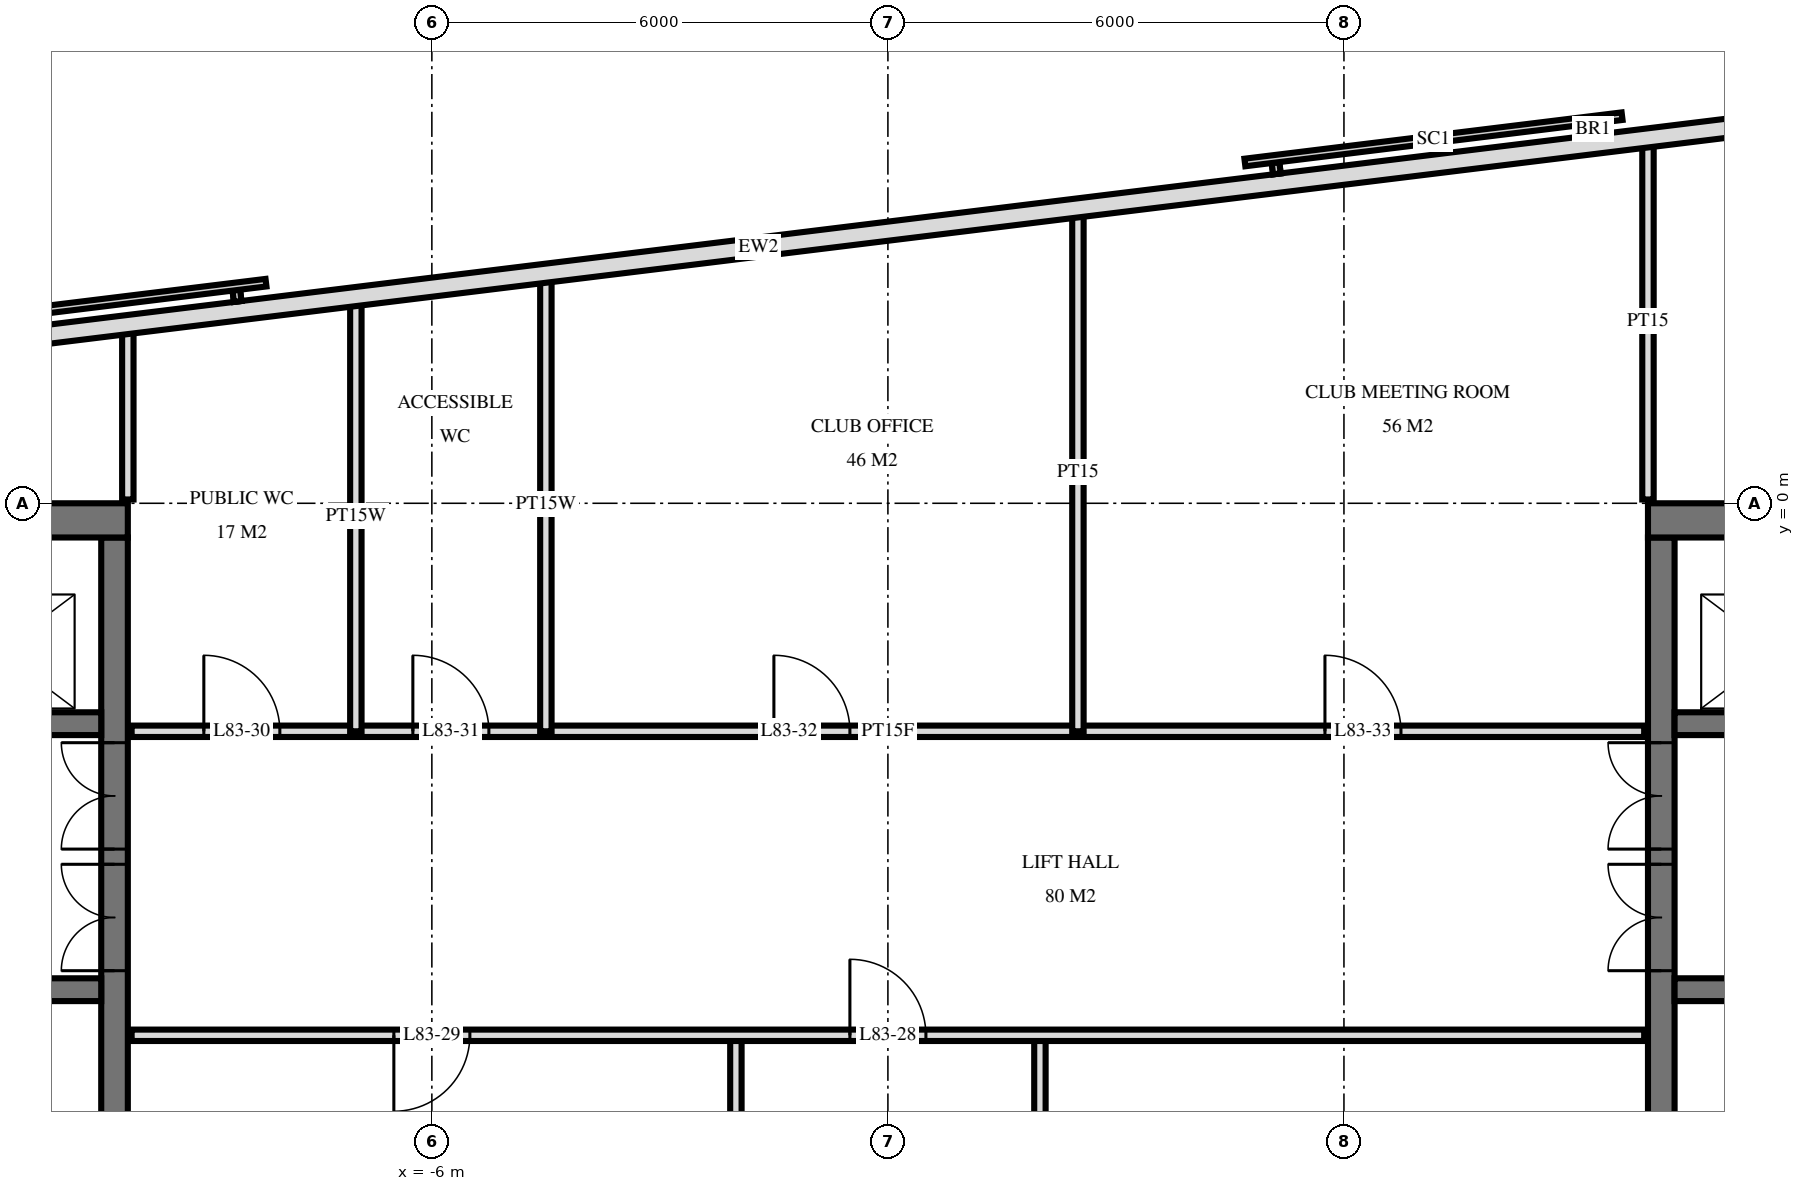
"""IFC4 building model, lengths in metres.
Left out: names, types, materials, properties, quantities, classifications, styles, units other than length and angle.
Written with IfcOpenShell. Run it as: python <this file> out.ifc"""

import sys

from ifc_helpers import new_model, si_unit, direction, frame, frame_2d, origin, place, context, subcontext, project, spatial, rectangle, extrude, element, fill, save


model = new_model("IFC4")
c1 = context("Model", 3, precision=1e-05, world=origin(), true_north=direction((0.0, 1.0)))
c2 = subcontext(c1, "Body", "Model", "MODEL_VIEW")
j1 = project(units=[si_unit("LENGTHUNIT", "METRE"), si_unit("PLANEANGLEUNIT", "RADIAN")], contexts=[c1])
p1 = place(None, origin())
s1 = spatial("IfcSite", under=j1, at=p1, CompositionType="ELEMENT")
p2 = place(p1, origin())
s2 = spatial("IfcBuilding", under=s1, at=p2, CompositionType="ELEMENT")
p3 = place(p2, frame((0.0, 0.0, 314.6)))
s3 = spatial("IfcBuildingStorey", under=s2, at=p3, CompositionType="ELEMENT", Elevation=314.6)
p4 = place(p3, frame((-19.5, -0.225, 0.0), z_axis=(0.0, 0.0, 1.0), x_axis=(1.0, 0.0, 0.0)))
e1 = element("IfcWall", 1, at=p4, inside=s3, PredefinedType="SHEAR", context=c2, shape_type="SweptSolid", body=[
    extrude(rectangle(XDim=9.5, YDim=0.45, at=frame_2d((4.75, 0.0))), origin(), (0.0, 0.0, 1.0), 4.0),
])
p5 = place(p3, frame((-10.175, -14.55, 0.0), z_axis=(0.0, 0.0, 1.0), x_axis=(0.0, 1.0, 0.0)))
e2 = element("IfcWall", 2, at=p5, inside=s3, PredefinedType="SHEAR", context=c2, shape_type="SweptSolid", body=[
    extrude(rectangle(XDim=14.1, YDim=0.35, at=frame_2d((7.05, 0.0))), origin(), (0.0, 0.0, 1.0), 4.0),
])
p6 = place(p5, frame((8.4, 0.0, 0.0)))
e3 = element("IfcOpeningElement", 3, at=p6, cuts=e2, PredefinedType="OPENING", context=c2, shape_type="SweptSolid", body=[
    extrude(rectangle(XDim=1.4, YDim=2.4, at=frame_2d((0.7, 1.2))), frame((0.0, 0.185, 0.0), z_axis=(0.0, -1.0, 0.0), x_axis=(1.0, 0.0, 0.0)), (0.0, 0.0, 1.0), 0.37),
])
p7 = place(p5, frame((10.0, 0.0, 0.0)))
e4 = element("IfcOpeningElement", 4, at=p7, cuts=e2, PredefinedType="OPENING", context=c2, shape_type="SweptSolid", body=[
    extrude(rectangle(XDim=1.4, YDim=2.4, at=frame_2d((0.7, 1.2))), frame((0.0, 0.185, 0.0), z_axis=(0.0, -1.0, 0.0), x_axis=(1.0, 0.0, 0.0)), (0.0, 0.0, 1.0), 0.37),
])
p8 = place(p5, frame((4.0, 0.0, 0.0)))
e5 = element("IfcOpeningElement", 5, at=p8, cuts=e2, PredefinedType="OPENING", context=c2, shape_type="SweptSolid", body=[
    extrude(rectangle(XDim=1.2, YDim=2.1, at=frame_2d((0.6, 1.05))), frame((0.0, 0.185, 0.0), z_axis=(0.0, -1.0, 0.0), x_axis=(1.0, 0.0, 0.0)), (0.0, 0.0, 1.0), 0.37),
])
p9 = place(p3, frame((-19.05, -2.9, 0.0), z_axis=(0.0, 0.0, 1.0), x_axis=(1.0, 0.0, 0.0)))
e6 = element("IfcWall", 6, at=p9, inside=s3, PredefinedType="SHEAR", context=c2, shape_type="SweptSolid", body=[
    extrude(rectangle(XDim=8.7, YDim=0.3, at=frame_2d((4.35, 0.0))), origin(), (0.0, 0.0, 1.0), 4.0),
])
p10 = place(p9, frame((6.8, 0.0, 0.0)))
e7 = element("IfcOpeningElement", 7, at=p10, cuts=e6, PredefinedType="OPENING", context=c2, shape_type="SweptSolid", body=[
    extrude(rectangle(XDim=1.1, YDim=2.1, at=frame_2d((0.55, 1.05))), frame((0.0, 0.16, 0.0), z_axis=(0.0, -1.0, 0.0), x_axis=(1.0, 0.0, 0.0)), (0.0, 0.0, 1.0), 0.32),
])
p11 = place(p9, frame((3.8, 0.0, 0.0)))
e8 = element("IfcOpeningElement", 8, at=p11, cuts=e6, PredefinedType="OPENING", context=c2, shape_type="SweptSolid", body=[
    extrude(rectangle(XDim=1.1, YDim=2.1, at=frame_2d((0.55, 1.05))), frame((0.0, 0.16, 0.0), z_axis=(0.0, -1.0, 0.0), x_axis=(1.0, 0.0, 0.0)), (0.0, 0.0, 1.0), 0.32),
])
p12 = place(p9, frame((0.9, 0.0, 0.0)))
e9 = element("IfcOpeningElement", 9, at=p12, cuts=e6, PredefinedType="OPENING", context=c2, shape_type="SweptSolid", body=[
    extrude(rectangle(XDim=0.9, YDim=2.1, at=frame_2d((0.45, 1.05))), frame((0.0, 0.16, 0.0), z_axis=(0.0, -1.0, 0.0), x_axis=(1.0, 0.0, 0.0)), (0.0, 0.0, 1.0), 0.32),
])
p13 = place(p3, frame((-19.05, -6.4, 0.0), z_axis=(0.0, 0.0, 1.0), x_axis=(1.0, 0.0, 0.0)))
e10 = element("IfcWall", 10, at=p13, inside=s3, PredefinedType="SHEAR", context=c2, shape_type="SweptSolid", body=[
    extrude(rectangle(XDim=8.7, YDim=0.3, at=frame_2d((4.35, 0.0))), origin(), (0.0, 0.0, 1.0), 4.0),
])
p14 = place(p13, frame((0.8, 0.0, 0.0)))
e11 = element("IfcOpeningElement", 11, at=p14, cuts=e10, PredefinedType="OPENING", context=c2, shape_type="SweptSolid", body=[
    extrude(rectangle(XDim=1.1, YDim=2.1, at=frame_2d((0.55, 1.05))), frame((0.0, 0.16, 0.0), z_axis=(0.0, -1.0, 0.0), x_axis=(1.0, 0.0, 0.0)), (0.0, 0.0, 1.0), 0.32),
])
p15 = place(p3, frame((10.0, -0.225, 0.0), z_axis=(0.0, 0.0, 1.0), x_axis=(1.0, 0.0, 0.0)))
e12 = element("IfcWall", 12, at=p15, inside=s3, PredefinedType="SHEAR", context=c2, shape_type="SweptSolid", body=[
    extrude(rectangle(XDim=9.5, YDim=0.45, at=frame_2d((4.75, 0.0))), origin(), (0.0, 0.0, 1.0), 4.0),
])
p16 = place(p3, frame((10.175, -14.55, 0.0), z_axis=(0.0, 0.0, 1.0), x_axis=(0.0, 1.0, 0.0)))
e13 = element("IfcWall", 13, at=p16, inside=s3, PredefinedType="SHEAR", context=c2, shape_type="SweptSolid", body=[
    extrude(rectangle(XDim=14.1, YDim=0.35, at=frame_2d((7.05, 0.0))), origin(), (0.0, 0.0, 1.0), 4.0),
])
p17 = place(p16, frame((8.4, 0.0, 0.0)))
e14 = element("IfcOpeningElement", 14, at=p17, cuts=e13, PredefinedType="OPENING", context=c2, shape_type="SweptSolid", body=[
    extrude(rectangle(XDim=1.4, YDim=2.4, at=frame_2d((0.7, 1.2))), frame((0.0, 0.185, 0.0), z_axis=(0.0, -1.0, 0.0), x_axis=(1.0, 0.0, 0.0)), (0.0, 0.0, 1.0), 0.37),
])
p18 = place(p16, frame((10.0, 0.0, 0.0)))
e15 = element("IfcOpeningElement", 15, at=p18, cuts=e13, PredefinedType="OPENING", context=c2, shape_type="SweptSolid", body=[
    extrude(rectangle(XDim=1.4, YDim=2.4, at=frame_2d((0.7, 1.2))), frame((0.0, 0.185, 0.0), z_axis=(0.0, -1.0, 0.0), x_axis=(1.0, 0.0, 0.0)), (0.0, 0.0, 1.0), 0.37),
])
p19 = place(p16, frame((4.0, 0.0, 0.0)))
e16 = element("IfcOpeningElement", 16, at=p19, cuts=e13, PredefinedType="OPENING", context=c2, shape_type="SweptSolid", body=[
    extrude(rectangle(XDim=1.2, YDim=2.1, at=frame_2d((0.6, 1.05))), frame((0.0, 0.185, 0.0), z_axis=(0.0, -1.0, 0.0), x_axis=(1.0, 0.0, 0.0)), (0.0, 0.0, 1.0), 0.37),
])
p20 = place(p3, frame((10.35, -2.9, 0.0), z_axis=(0.0, 0.0, 1.0), x_axis=(1.0, 0.0, 0.0)))
e17 = element("IfcWall", 17, at=p20, inside=s3, PredefinedType="SHEAR", context=c2, shape_type="SweptSolid", body=[
    extrude(rectangle(XDim=8.7, YDim=0.3, at=frame_2d((4.35, 0.0))), origin(), (0.0, 0.0, 1.0), 4.0),
])
p21 = place(p20, frame((0.8, 0.0, 0.0)))
e18 = element("IfcOpeningElement", 18, at=p21, cuts=e17, PredefinedType="OPENING", context=c2, shape_type="SweptSolid", body=[
    extrude(rectangle(XDim=1.1, YDim=2.1, at=frame_2d((0.55, 1.05))), frame((0.0, 0.16, 0.0), z_axis=(0.0, -1.0, 0.0), x_axis=(1.0, 0.0, 0.0)), (0.0, 0.0, 1.0), 0.32),
])
p22 = place(p20, frame((3.8, 0.0, 0.0)))
e19 = element("IfcOpeningElement", 19, at=p22, cuts=e17, PredefinedType="OPENING", context=c2, shape_type="SweptSolid", body=[
    extrude(rectangle(XDim=1.1, YDim=2.1, at=frame_2d((0.55, 1.05))), frame((0.0, 0.16, 0.0), z_axis=(0.0, -1.0, 0.0), x_axis=(1.0, 0.0, 0.0)), (0.0, 0.0, 1.0), 0.32),
])
p23 = place(p20, frame((6.9, 0.0, 0.0)))
e20 = element("IfcOpeningElement", 20, at=p23, cuts=e17, PredefinedType="OPENING", context=c2, shape_type="SweptSolid", body=[
    extrude(rectangle(XDim=0.9, YDim=2.1, at=frame_2d((0.45, 1.05))), frame((0.0, 0.16, 0.0), z_axis=(0.0, -1.0, 0.0), x_axis=(1.0, 0.0, 0.0)), (0.0, 0.0, 1.0), 0.32),
])
p24 = place(p3, frame((10.35, -6.4, 0.0), z_axis=(0.0, 0.0, 1.0), x_axis=(1.0, 0.0, 0.0)))
e21 = element("IfcWall", 21, at=p24, inside=s3, PredefinedType="SHEAR", context=c2, shape_type="SweptSolid", body=[
    extrude(rectangle(XDim=8.7, YDim=0.3, at=frame_2d((4.35, 0.0))), origin(), (0.0, 0.0, 1.0), 4.0),
])
p25 = place(p24, frame((6.8, 0.0, 0.0)))
e22 = element("IfcOpeningElement", 22, at=p25, cuts=e21, PredefinedType="OPENING", context=c2, shape_type="SweptSolid", body=[
    extrude(rectangle(XDim=1.1, YDim=2.1, at=frame_2d((0.55, 1.05))), frame((0.0, 0.16, 0.0), z_axis=(0.0, -1.0, 0.0), x_axis=(1.0, 0.0, 0.0)), (0.0, 0.0, 1.0), 0.32),
])
p26 = place(p3, frame((16.138, 5.561, 0.0), z_axis=(0.0, 0.0, 1.0), x_axis=(-0.992546726876, -0.121864658405, 0.0)))
e23 = element("IfcWall", 23, at=p26, inside=s3, PredefinedType="SOLIDWALL", context=c2, shape_type="SweptSolid", body=[
    extrude(rectangle(XDim=35.951, YDim=0.25, at=frame_2d((17.975, 0.0))), origin(), (0.0, 0.0, 1.0), 3.72),
])
p27 = place(p3, frame((10.0, 0.05, 0.0), z_axis=(0.0, 0.0, 1.0), x_axis=(0.0, 1.0, 0.0)))
e24 = element("IfcWall", 24, at=p27, inside=s3, PredefinedType="PARTITIONING", context=c2, shape_type="SweptSolid", body=[
    extrude(rectangle(XDim=4.702, YDim=0.15, at=frame_2d((2.351, 0.0))), origin(), (0.0, 0.0, 1.0), 3.72),
])
p28 = place(p3, frame((2.5, -3.0, 0.0), z_axis=(0.0, 0.0, 1.0), x_axis=(0.0, 1.0, 0.0)))
e25 = element("IfcWall", 25, at=p28, inside=s3, PredefinedType="PARTITIONING", context=c2, shape_type="SweptSolid", body=[
    extrude(rectangle(XDim=6.832, YDim=0.15, at=frame_2d((3.416, 0.0))), origin(), (0.0, 0.0, 1.0), 3.72),
])
for number, where, z_axis, x_axis in (
    (26, (2.0, -11.0, 0.0), (0.0, 0.0, 1.0), (0.0, 1.0, 0.0)),
    (27, (-2.0, -11.0, 0.0), (0.0, 0.0, 1.0), (0.0, 1.0, 0.0)),
):
    element("IfcWall", number, at=place(p3, frame(where, z_axis=z_axis, x_axis=x_axis)), inside=s3, PredefinedType="PARTITIONING", context=c2, shape_type="SweptSolid", body=[
        extrude(rectangle(XDim=4.0, YDim=0.15, at=frame_2d((2.0, 0.0))), origin(), (0.0, 0.0, 1.0), 3.72),
    ])
p29 = place(p3, frame((-4.5, -3.0, 0.0), z_axis=(0.0, 0.0, 1.0), x_axis=(0.0, 1.0, 0.0)))
e28 = element("IfcWall", 28, at=p29, inside=s3, PredefinedType="PLUMBINGWALL", context=c2, shape_type="SweptSolid", body=[
    extrude(rectangle(XDim=5.972, YDim=0.15, at=frame_2d((2.986, 0.0))), origin(), (0.0, 0.0, 1.0), 3.72),
])
p30 = place(p3, frame((-7.0, -3.0, 0.0), z_axis=(0.0, 0.0, 1.0), x_axis=(0.0, 1.0, 0.0)))
e29 = element("IfcWall", 29, at=p30, inside=s3, PredefinedType="PLUMBINGWALL", context=c2, shape_type="SweptSolid", body=[
    extrude(rectangle(XDim=5.665, YDim=0.15, at=frame_2d((2.833, 0.0))), origin(), (0.0, 0.0, 1.0), 3.72),
])
p31 = place(p3, frame((-10.0, 0.05, 0.0), z_axis=(0.0, 0.0, 1.0), x_axis=(0.0, 1.0, 0.0)))
e30 = element("IfcWall", 30, at=p31, inside=s3, PredefinedType="PLUMBINGWALL", context=c2, shape_type="SweptSolid", body=[
    extrude(rectangle(XDim=2.247, YDim=0.15, at=frame_2d((1.123, 0.0))), origin(), (0.0, 0.0, 1.0), 3.72),
])
p32 = place(p3, frame((-9.95, -7.0, 0.0), z_axis=(0.0, 0.0, 1.0), x_axis=(1.0, 0.0, 0.0)))
e31 = element("IfcWall", 31, at=p32, inside=s3, PredefinedType="PARTITIONING", context=c2, shape_type="SweptSolid", body=[
    extrude(rectangle(XDim=19.9, YDim=0.15, at=frame_2d((9.95, 0.0))), origin(), (0.0, 0.0, 1.0), 3.72),
])
p33 = place(p32, frame((9.45, 0.0, 0.0)))
e32 = element("IfcOpeningElement", 32, at=p33, cuts=e31, PredefinedType="OPENING", context=c2, shape_type="SweptSolid", body=[
    extrude(rectangle(XDim=1.0, YDim=2.1, at=frame_2d((0.5, 1.05))), frame((0.0, 0.085, 0.0), z_axis=(0.0, -1.0, 0.0), x_axis=(1.0, 0.0, 0.0)), (0.0, 0.0, 1.0), 0.17),
])
p34 = place(p32, frame((3.45, 0.0, 0.0)))
e33 = element("IfcOpeningElement", 33, at=p34, cuts=e31, PredefinedType="OPENING", context=c2, shape_type="SweptSolid", body=[
    extrude(rectangle(XDim=1.0, YDim=2.1, at=frame_2d((0.5, 1.05))), frame((0.0, 0.085, 0.0), z_axis=(0.0, -1.0, 0.0), x_axis=(1.0, 0.0, 0.0)), (0.0, 0.0, 1.0), 0.17),
])
p35 = place(p3, frame((-9.95, -3.0, 0.0), z_axis=(0.0, 0.0, 1.0), x_axis=(1.0, 0.0, 0.0)))
e34 = element("IfcWall", 34, at=p35, inside=s3, PredefinedType="PARTITIONING", context=c2, shape_type="SweptSolid", body=[
    extrude(rectangle(XDim=19.9, YDim=0.15, at=frame_2d((9.95, 0.0))), origin(), (0.0, 0.0, 1.0), 3.72),
])
p36 = place(p35, frame((0.95, 0.0, 0.0)))
e35 = element("IfcOpeningElement", 35, at=p36, cuts=e34, PredefinedType="OPENING", context=c2, shape_type="SweptSolid", body=[
    extrude(rectangle(XDim=1.0, YDim=2.1, at=frame_2d((0.5, 1.05))), frame((0.0, 0.085, 0.0), z_axis=(0.0, -1.0, 0.0), x_axis=(1.0, 0.0, 0.0)), (0.0, 0.0, 1.0), 0.17),
])
p37 = place(p35, frame((3.7, 0.0, 0.0)))
e36 = element("IfcOpeningElement", 36, at=p37, cuts=e34, PredefinedType="OPENING", context=c2, shape_type="SweptSolid", body=[
    extrude(rectangle(XDim=1.0, YDim=2.1, at=frame_2d((0.5, 1.05))), frame((0.0, 0.085, 0.0), z_axis=(0.0, -1.0, 0.0), x_axis=(1.0, 0.0, 0.0)), (0.0, 0.0, 1.0), 0.17),
])
p38 = place(p35, frame((8.45, 0.0, 0.0)))
e37 = element("IfcOpeningElement", 37, at=p38, cuts=e34, PredefinedType="OPENING", context=c2, shape_type="SweptSolid", body=[
    extrude(rectangle(XDim=1.0, YDim=2.1, at=frame_2d((0.5, 1.05))), frame((0.0, 0.085, 0.0), z_axis=(0.0, -1.0, 0.0), x_axis=(1.0, 0.0, 0.0)), (0.0, 0.0, 1.0), 0.17),
])
p39 = place(p35, frame((15.7, 0.0, 0.0)))
e38 = element("IfcOpeningElement", 38, at=p39, cuts=e34, PredefinedType="OPENING", context=c2, shape_type="SweptSolid", body=[
    extrude(rectangle(XDim=1.0, YDim=2.1, at=frame_2d((0.5, 1.05))), frame((0.0, 0.085, 0.0), z_axis=(0.0, -1.0, 0.0), x_axis=(1.0, 0.0, 0.0)), (0.0, 0.0, 1.0), 0.17),
])
p40 = place(p6, origin())
e39 = element("IfcDoor", 39, at=p40, inside=s3, OperationType="DOUBLE_DOOR_SINGLE_SWING", PredefinedType="DOOR", context=c2, shape_type="SweptSolid", body=[
    extrude(rectangle(XDim=1.4, YDim=2.4, at=frame_2d((0.7, 1.2))), frame((0.0, 0.025, 0.0), z_axis=(0.0, -1.0, 0.0), x_axis=(1.0, 0.0, 0.0)), (0.0, 0.0, 1.0), 0.05),
])
fill(e3, e39)
p41 = place(p7, origin())
e40 = element("IfcDoor", 40, at=p41, inside=s3, OperationType="DOUBLE_DOOR_SINGLE_SWING", PredefinedType="DOOR", context=c2, shape_type="SweptSolid", body=[
    extrude(rectangle(XDim=1.4, YDim=2.4, at=frame_2d((0.7, 1.2))), frame((0.0, 0.025, 0.0), z_axis=(0.0, -1.0, 0.0), x_axis=(1.0, 0.0, 0.0)), (0.0, 0.0, 1.0), 0.05),
])
fill(e4, e40)
p42 = place(p17, origin())
e41 = element("IfcDoor", 41, at=p42, inside=s3, OperationType="DOUBLE_DOOR_SINGLE_SWING", PredefinedType="DOOR", context=c2, shape_type="SweptSolid", body=[
    extrude(rectangle(XDim=1.4, YDim=2.4, at=frame_2d((0.7, 1.2))), frame((0.0, 0.025, 0.0), z_axis=(0.0, -1.0, 0.0), x_axis=(1.0, 0.0, 0.0)), (0.0, 0.0, 1.0), 0.05),
])
fill(e14, e41)
p43 = place(p18, origin())
e42 = element("IfcDoor", 42, at=p43, inside=s3, OperationType="DOUBLE_DOOR_SINGLE_SWING", PredefinedType="DOOR", context=c2, shape_type="SweptSolid", body=[
    extrude(rectangle(XDim=1.4, YDim=2.4, at=frame_2d((0.7, 1.2))), frame((0.0, 0.025, 0.0), z_axis=(0.0, -1.0, 0.0), x_axis=(1.0, 0.0, 0.0)), (0.0, 0.0, 1.0), 0.05),
])
fill(e15, e42)
p44 = place(p33, origin())
e43 = element("IfcDoor", 43, at=p44, inside=s3, OperationType="SINGLE_SWING_RIGHT", PredefinedType="DOOR", context=c2, shape_type="SweptSolid", body=[
    extrude(rectangle(XDim=1.0, YDim=2.1, at=frame_2d((0.5, 1.05))), frame((0.0, 0.025, 0.0), z_axis=(0.0, -1.0, 0.0), x_axis=(1.0, 0.0, 0.0)), (0.0, 0.0, 1.0), 0.05),
])
fill(e32, e43)
p45 = place(p34, frame((0.5, 0.0, 0.0), z_axis=(0.0, 0.0, 1.0), x_axis=(-1.0, 0.0, 0.0)))
e44 = element("IfcDoor", 44, at=p45, inside=s3, OperationType="SINGLE_SWING_LEFT", PredefinedType="DOOR", context=c2, shape_type="SweptSolid", body=[
    extrude(rectangle(XDim=1.0, YDim=2.1, at=frame_2d((0.0, 1.05))), frame((0.0, -0.025, 0.0), z_axis=(0.0, 1.0, 0.0), x_axis=(-1.0, 0.0, 0.0)), (0.0, 0.0, 1.0), 0.05),
])
fill(e33, e44)
p46 = place(p36, origin())
e45 = element("IfcDoor", 45, at=p46, inside=s3, OperationType="SINGLE_SWING_RIGHT", PredefinedType="DOOR", context=c2, shape_type="SweptSolid", body=[
    extrude(rectangle(XDim=1.0, YDim=2.1, at=frame_2d((0.5, 1.05))), frame((0.0, 0.025, 0.0), z_axis=(0.0, -1.0, 0.0), x_axis=(1.0, 0.0, 0.0)), (0.0, 0.0, 1.0), 0.05),
])
fill(e35, e45)
p47 = place(p37, origin())
e46 = element("IfcDoor", 46, at=p47, inside=s3, OperationType="SINGLE_SWING_RIGHT", PredefinedType="DOOR", context=c2, shape_type="SweptSolid", body=[
    extrude(rectangle(XDim=1.0, YDim=2.1, at=frame_2d((0.5, 1.05))), frame((0.0, 0.025, 0.0), z_axis=(0.0, -1.0, 0.0), x_axis=(1.0, 0.0, 0.0)), (0.0, 0.0, 1.0), 0.05),
])
fill(e36, e46)
p48 = place(p38, origin())
e47 = element("IfcDoor", 47, at=p48, inside=s3, OperationType="SINGLE_SWING_RIGHT", PredefinedType="DOOR", context=c2, shape_type="SweptSolid", body=[
    extrude(rectangle(XDim=1.0, YDim=2.1, at=frame_2d((0.5, 1.05))), frame((0.0, 0.025, 0.0), z_axis=(0.0, -1.0, 0.0), x_axis=(1.0, 0.0, 0.0)), (0.0, 0.0, 1.0), 0.05),
])
fill(e37, e47)
p49 = place(p39, origin())
e48 = element("IfcDoor", 48, at=p49, inside=s3, OperationType="SINGLE_SWING_RIGHT", PredefinedType="DOOR", context=c2, shape_type="SweptSolid", body=[
    extrude(rectangle(XDim=1.0, YDim=2.1, at=frame_2d((0.5, 1.05))), frame((0.0, 0.025, 0.0), z_axis=(0.0, -1.0, 0.0), x_axis=(1.0, 0.0, 0.0)), (0.0, 0.0, 1.0), 0.05),
])
fill(e38, e48)
save(model, sys.argv[1])
